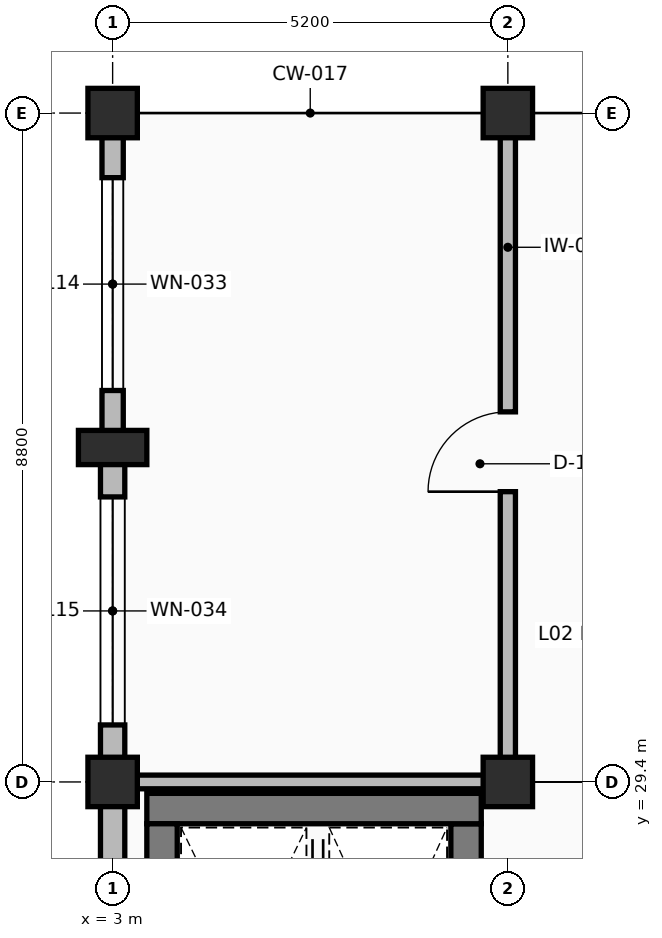
"""IFC4 building model, lengths in metres.
Left out: names, types, materials, properties, quantities, classifications, styles, units other than length and angle.
Written with IfcOpenShell. Run it as: python <this file> out.ifc"""

import sys

from ifc_helpers import new_model, si_unit, direction, frame, frame_2d, origin, origin_2d, place, context, subcontext, project, spatial, rectangle, extrude, element, fill, save


model = new_model("IFC4")
c1 = context("Model", 3, precision=1e-05, world=origin(), true_north=direction((0.0, 1.0)))
c2 = subcontext(c1, "Body", "Model", "MODEL_VIEW")
j1 = project(units=[si_unit("LENGTHUNIT", "METRE"), si_unit("PLANEANGLEUNIT", "RADIAN")], contexts=[c1])
p1 = place(None, origin())
s1 = spatial("IfcSite", under=j1, at=p1, CompositionType="ELEMENT")
p2 = place(p1, origin())
s2 = spatial("IfcBuilding", under=s1, at=p2, CompositionType="ELEMENT")
p3 = place(p2, frame((0.0, 0.0, 9.6)))
s3 = spatial("IfcBuildingStorey", under=s2, at=p3, CompositionType="ELEMENT", Elevation=9.6)
for number, where, z_axis, x_axis in (
    (1, (3.0, 29.4, 0.0), (0.0, 0.0, 1.0), (1.0, 0.0, 0.0)),
    (2, (3.0, 38.2, 0.0), (0.0, 0.0, 1.0), (1.0, 0.0, 0.0)),
    (3, (8.2, 29.4, 0.0), (0.0, 0.0, 1.0), (1.0, 0.0, 0.0)),
    (4, (8.2, 38.2, 0.0), (0.0, 0.0, 1.0), (1.0, 0.0, 0.0)),
):
    element("IfcColumn", number, at=place(p3, frame(where, z_axis=z_axis, x_axis=x_axis)), inside=s3, PredefinedType="COLUMN", context=c2, shape_type="SweptSolid", body=[
        extrude(rectangle(XDim=0.65, YDim=0.65, at=origin_2d()), origin(), (0.0, 0.0, 1.0), 4.8),
    ])
p4 = place(p3, frame((3.0, 33.8, 0.0), z_axis=(0.0, 0.0, 1.0), x_axis=(0.0, 1.0, 0.0)))
e5 = element("IfcColumn", 5, at=p4, inside=s3, PredefinedType="PILASTER", context=c2, shape_type="SweptSolid", body=[
    extrude(rectangle(XDim=0.45, YDim=0.9, at=origin_2d()), origin(), (0.0, 0.0, 1.0), 4.8),
])
p5 = place(p3, frame((3.0, 29.08, 0.0), z_axis=(0.0, 0.0, 1.0), x_axis=(0.0, -1.0, 0.0)))
e6 = element("IfcWall", 6, at=p5, inside=s3, PredefinedType="SOLIDWALL", context=c2, shape_type="SweptSolid", body=[
    extrude(rectangle(XDim=8.16, YDim=0.32, at=frame_2d((4.08, 0.0))), origin(), (0.0, 0.0, 1.0), 3.71),
])
p6 = place(p5, frame((2.78, 0.0, 0.9)))
e7 = element("IfcOpeningElement", 7, at=p6, cuts=e6, PredefinedType="OPENING", context=c2, shape_type="SweptSolid", body=[
    extrude(rectangle(XDim=2.6, YDim=1.55, at=frame_2d((1.3, 0.775))), frame((0.0, 0.17, 0.0), z_axis=(0.0, -1.0, 0.0), x_axis=(1.0, 0.0, 0.0)), (0.0, 0.0, 1.0), 0.34),
])
p7 = place(p3, frame((3.0, 37.88, 0.0), z_axis=(0.0, 0.0, 1.0), x_axis=(0.0, -1.0, 0.0)))
e8 = element("IfcWall", 8, at=p7, inside=s3, PredefinedType="SOLIDWALL", context=c2, shape_type="SweptSolid", body=[
    extrude(rectangle(XDim=3.86, YDim=0.28, at=frame_2d((1.93, 0.0))), origin(), (0.0, 0.0, 1.0), 3.71),
])
p8 = place(p7, frame((0.53, 0.0, 0.9)))
e9 = element("IfcOpeningElement", 9, at=p8, cuts=e8, PredefinedType="OPENING", context=c2, shape_type="SweptSolid", body=[
    extrude(rectangle(XDim=2.8, YDim=1.4, at=frame_2d((1.4, 0.7))), frame((0.0, 0.15, 0.0), z_axis=(0.0, -1.0, 0.0), x_axis=(1.0, 0.0, 0.0)), (0.0, 0.0, 1.0), 0.3),
])
p9 = place(p3, frame((3.0, 33.58, 0.0), z_axis=(0.0, 0.0, 1.0), x_axis=(0.0, -1.0, 0.0)))
e10 = element("IfcWall", 10, at=p9, inside=s3, PredefinedType="SOLIDWALL", context=c2, shape_type="SweptSolid", body=[
    extrude(rectangle(XDim=3.86, YDim=0.32, at=frame_2d((1.93, 0.0))), origin(), (0.0, 0.0, 1.0), 3.71),
])
p10 = place(p9, frame((0.43, 0.0, 0.9)))
e11 = element("IfcOpeningElement", 11, at=p10, cuts=e10, PredefinedType="OPENING", context=c2, shape_type="SweptSolid", body=[
    extrude(rectangle(XDim=3.0, YDim=1.55, at=frame_2d((1.5, 0.775))), frame((0.0, 0.17, 0.0), z_axis=(0.0, -1.0, 0.0), x_axis=(1.0, 0.0, 0.0)), (0.0, 0.0, 1.0), 0.34),
])
p11 = place(p3, frame((7.65, 25.35, 0.0), z_axis=(0.0, 0.0, 1.0), x_axis=(0.0, 1.0, 0.0)))
e12 = element("IfcWall", 12, at=p11, inside=s3, PredefinedType="SHEAR", context=c2, shape_type="SweptSolid", body=[
    extrude(rectangle(XDim=3.5, YDim=0.4, at=frame_2d((1.75, 0.0))), origin(), (0.0, 0.0, 1.0), 4.49),
])
p12 = place(p3, frame((7.85, 29.05, 0.0), z_axis=(0.0, 0.0, 1.0), x_axis=(-1.0, 0.0, 0.0)))
e13 = element("IfcWall", 13, at=p12, inside=s3, PredefinedType="SHEAR", context=c2, shape_type="SweptSolid", body=[
    extrude(rectangle(XDim=4.4, YDim=0.4, at=frame_2d((2.2, 0.0))), origin(), (0.0, 0.0, 1.0), 4.49),
])
p13 = place(p3, frame((3.65, 28.85, 0.0), z_axis=(0.0, 0.0, 1.0), x_axis=(0.0, -1.0, 0.0)))
e14 = element("IfcWall", 14, at=p13, inside=s3, PredefinedType="SHEAR", context=c2, shape_type="SweptSolid", body=[
    extrude(rectangle(XDim=3.5, YDim=0.4, at=frame_2d((1.75, 0.0))), origin(), (0.0, 0.0, 1.0), 4.49),
])
p14 = place(p3, frame((3.2, 29.4, 0.0), z_axis=(0.0, 0.0, 1.0), x_axis=(1.0, 0.0, 0.0)))
e15 = element("IfcWall", 15, at=p14, inside=s3, PredefinedType="STANDARD", context=c2, shape_type="SweptSolid", body=[
    extrude(rectangle(XDim=5.0, YDim=0.18, at=frame_2d((2.5, 0.0))), origin(), (0.0, 0.0, 1.0), 3.6),
])
p15 = place(p3, frame((8.2, 29.488, 0.0), z_axis=(0.0, 0.0, 1.0), x_axis=(0.0, 1.0, 0.0)))
e16 = element("IfcWall", 16, at=p15, inside=s3, PredefinedType="PARTITIONING", context=c2, shape_type="SweptSolid", body=[
    extrude(rectangle(XDim=8.512, YDim=0.2, at=frame_2d((4.256, 0.0))), origin(), (0.0, 0.0, 1.0), 3.6),
])
p16 = place(p15, frame((3.731, 0.0, 0.0)))
e17 = element("IfcOpeningElement", 17, at=p16, cuts=e16, PredefinedType="OPENING", context=c2, shape_type="SweptSolid", body=[
    extrude(rectangle(XDim=1.05, YDim=2.15, at=frame_2d((0.525, 1.075))), frame((0.0, 0.11, 0.0), z_axis=(0.0, -1.0, 0.0), x_axis=(1.0, 0.0, 0.0)), (0.0, 0.0, 1.0), 0.22),
])
p17 = place(p8, origin())
e18 = element("IfcWindow", 18, at=p17, inside=s3, PartitioningType="SINGLE_PANEL", PredefinedType="WINDOW", context=c2, shape_type="SweptSolid", body=[
    extrude(rectangle(XDim=2.8, YDim=1.4, at=frame_2d((1.4, 0.7))), frame((0.0, 0.03, 0.0), z_axis=(0.0, -1.0, 0.0), x_axis=(1.0, 0.0, 0.0)), (0.0, 0.0, 1.0), 0.06),
])
fill(e9, e18)
p18 = place(p10, origin())
e19 = element("IfcWindow", 19, at=p18, inside=s3, PartitioningType="SINGLE_PANEL", PredefinedType="WINDOW", context=c2, shape_type="SweptSolid", body=[
    extrude(rectangle(XDim=3.0, YDim=1.55, at=frame_2d((1.5, 0.775))), frame((0.0, 0.03, 0.0), z_axis=(0.0, -1.0, 0.0), x_axis=(1.0, 0.0, 0.0)), (0.0, 0.0, 1.0), 0.06),
])
fill(e11, e19)
p19 = place(p16, origin())
e20 = element("IfcDoor", 20, at=p19, inside=s3, OperationType="SINGLE_SWING_LEFT", PredefinedType="DOOR", context=c2, shape_type="SweptSolid", body=[
    extrude(rectangle(XDim=1.05, YDim=2.15, at=frame_2d((0.525, 1.075))), frame((0.0, 0.025, 0.0), z_axis=(0.0, -1.0, 0.0), x_axis=(1.0, 0.0, 0.0)), (0.0, 0.0, 1.0), 0.05),
])
fill(e17, e20)
save(model, sys.argv[1])
